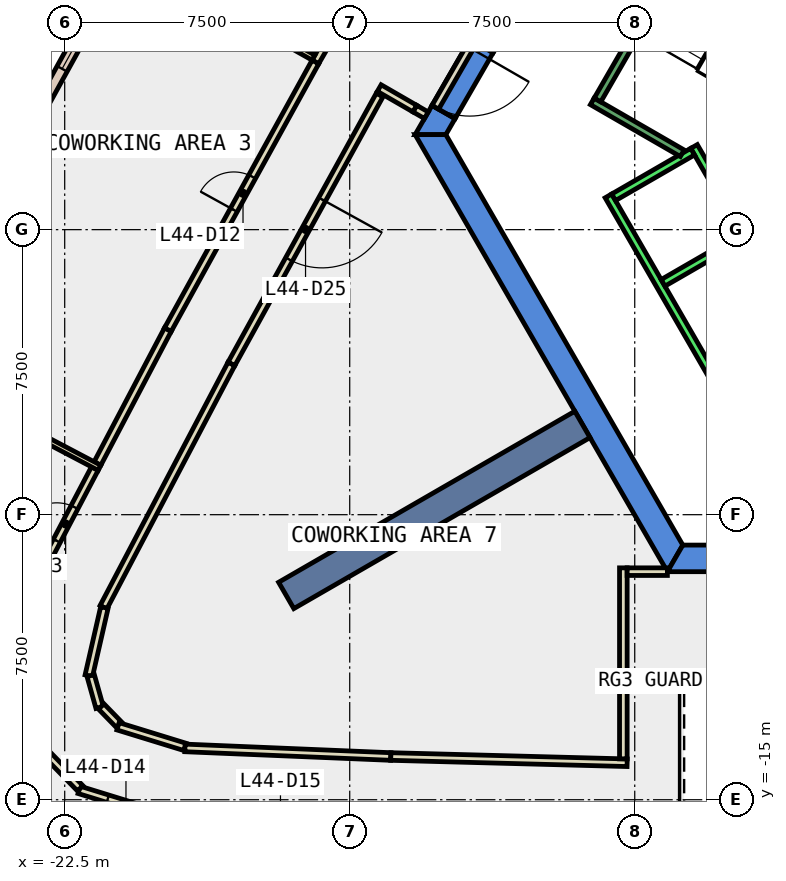
"""IFC4 building model, lengths in metres.
Left out: names, types, materials, properties, quantities, classifications, styles, units other than length and angle.
Written with IfcOpenShell. Run it as: python <this file> out.ifc"""

import sys

from ifc_helpers import new_model, si_unit, direction, frame, frame_2d, origin, place, context, subcontext, project, spatial, polyline, rectangle, outline, extrude, element, fill, save


model = new_model("IFC4")
c1 = context("Model", 3, precision=1e-05, world=origin(), true_north=direction((0.0, 1.0)))
c2 = subcontext(c1, "Body", "Model", "MODEL_VIEW")
j1 = project(units=[si_unit("LENGTHUNIT", "METRE"), si_unit("PLANEANGLEUNIT", "RADIAN")], contexts=[c1])
p1 = place(None, origin())
s1 = spatial("IfcSite", under=j1, at=p1, CompositionType="ELEMENT")
p2 = place(p1, origin())
s2 = spatial("IfcBuilding", under=s1, at=p2, CompositionType="ELEMENT")
p3 = place(p2, frame((0.0, 0.0, 198.2)))
s3 = spatial("IfcBuildingStorey", under=s2, at=p3, CompositionType="ELEMENT", Elevation=198.2)
p4 = place(p3, frame((0.0, 0.0, -0.4)))
e1 = element("IfcWall", 1, at=p4, inside=s3, PredefinedType="SHEAR", context=c2, shape_type="SweptSolid", body=[
    extrude(outline(polyline([(-11.834, 5.002), (-11.228, 4.652), (-6.235, 13.3), (-6.64, 14.0), (-11.834, 5.002)])), origin(), (0.0, 0.0, 1.0), 4.2),
])
p5 = place(p3, frame((0.0, 0.0, -0.4)))
e2 = element("IfcWall", 2, at=p5, inside=s3, PredefinedType="SHEAR", context=c2, shape_type="SweptSolid", body=[
    extrude(outline(polyline([(-12.228, 2.92), (-12.834, 3.27), (-13.279, 2.5), (-12.471, 2.5), (-12.228, 2.92)])), origin(), (0.0, 0.0, 1.0), 4.2),
])
p6 = place(p3, frame((0.0, 0.0, 3.6)))
e3 = element("IfcWall", 3, at=p6, inside=s3, PredefinedType="SHEAR", context=c2, shape_type="SweptSolid", body=[
    extrude(outline(polyline([(-12.834, 3.27), (-12.228, 2.92), (-11.228, 4.652), (-11.834, 5.002), (-12.834, 3.27)])), origin(), (0.0, 0.0, 1.0), 0.2),
])
p7 = place(p3, frame((0.0, 0.0, -0.4)))
e4 = element("IfcWall", 4, at=p7, inside=s3, PredefinedType="SHEAR", context=c2, shape_type="SweptSolid", body=[
    extrude(outline(polyline([(-13.279, 2.5), (-6.64, -9.0), (-6.235, -8.3), (-12.471, 2.5), (-13.279, 2.5)])), origin(), (0.0, 0.0, 1.0), 4.2),
])
p8 = place(p3, frame((0.0, 0.0, -0.4)))
e5 = element("IfcWall", 5, at=p8, inside=s3, PredefinedType="SHEAR", context=c2, shape_type="SweptSolid", body=[
    extrude(outline(polyline([(3.75, -9.0), (3.75, -8.3), (-6.235, -8.3), (-6.64, -9.0), (3.75, -9.0)])), origin(), (0.0, 0.0, 1.0), 4.2),
])
p9 = place(p3, frame((-8.877, -5.125, -0.4), z_axis=(0.0, 0.0, 1.0), x_axis=(-0.866017533419, -0.500013631625, 0.0)))
e6 = element("IfcWall", 6, at=p9, inside=s3, PredefinedType="SHEAR", context=c2, shape_type="SweptSolid", body=[
    extrude(rectangle(XDim=9.0, YDim=0.8, at=frame_2d((4.5, 0.0))), origin(), (0.0, 0.0, 1.0), 4.2),
])
p10 = place(p3, frame((-21.116, 6.865, 0.0), z_axis=(0.0, 0.0, 1.0), x_axis=(-0.482862185961, -0.875696356832, 0.0)))
e7 = element("IfcWall", 7, at=p10, inside=s3, PredefinedType="STANDARD", context=c2, shape_type="SweptSolid", body=[
    extrude(rectangle(XDim=7.23, YDim=0.3, at=frame_2d((3.615, 0.0))), origin(), (0.0, 0.0, 1.0), 3.8),
])
p11 = place(p10, frame((0.607, 0.0, 0.9)))
e8 = element("IfcOpeningElement", 8, at=p11, cuts=e7, PredefinedType="OPENING", context=c2, shape_type="SweptSolid", body=[
    extrude(rectangle(XDim=2.4, YDim=2.6, at=frame_2d((1.2, 1.3))), frame((0.0, 0.16, 0.0), z_axis=(0.0, -1.0, 0.0), x_axis=(1.0, 0.0, 0.0)), (0.0, 0.0, 1.0), 0.32),
])
p12 = place(p10, frame((4.222, 0.0, 0.9)))
e9 = element("IfcOpeningElement", 9, at=p12, cuts=e7, PredefinedType="OPENING", context=c2, shape_type="SweptSolid", body=[
    extrude(rectangle(XDim=2.4, YDim=2.6, at=frame_2d((1.2, 1.3))), frame((0.0, 0.16, 0.0), z_axis=(0.0, -1.0, 0.0), x_axis=(1.0, 0.0, 0.0)), (0.0, 0.0, 1.0), 0.32),
])
p13 = place(p3, frame((-18.112, -3.531, 0.0), z_axis=(0.0, 0.0, 1.0), x_axis=(-0.465461327558, -0.885068219149, 0.0)))
e10 = element("IfcWall", 10, at=p13, inside=s3, PredefinedType="PARTITIONING", context=c2, shape_type="SweptSolid", body=[
    extrude(rectangle(XDim=7.236, YDim=0.2, at=frame_2d((3.618, 0.0))), origin(), (0.0, 0.0, 1.0), 3.8),
])
p14 = place(p3, frame((-21.456, -9.944, 0.0), z_axis=(0.0, 0.0, 1.0), x_axis=(-0.222871656966, -0.974847795567, 0.0)))
e11 = element("IfcWall", 11, at=p14, inside=s3, PredefinedType="PARTITIONING", context=c2, shape_type="SweptSolid", body=[
    extrude(rectangle(XDim=1.839, YDim=0.2, at=frame_2d((0.919, 0.0))), origin(), (0.0, 0.0, 1.0), 3.8),
])
p15 = place(p3, frame((-21.816, -11.735, 0.0), z_axis=(0.0, 0.0, 1.0), x_axis=(0.270192443589, -0.962806337447, 0.0)))
e12 = element("IfcWall", 12, at=p15, inside=s3, PredefinedType="PARTITIONING", context=c2, shape_type="SweptSolid", body=[
    extrude(rectangle(XDim=0.869, YDim=0.2, at=frame_2d((0.435, 0.0))), origin(), (0.0, 0.0, 1.0), 3.8),
])
p16 = place(p3, frame((-21.538, -12.547, 0.0), z_axis=(0.0, 0.0, 1.0), x_axis=(0.697542638825, -0.716543276446, 0.0)))
e13 = element("IfcWall", 13, at=p16, inside=s3, PredefinedType="PARTITIONING", context=c2, shape_type="SweptSolid", body=[
    extrude(rectangle(XDim=0.668, YDim=0.2, at=frame_2d((0.334, 0.0))), origin(), (0.0, 0.0, 1.0), 3.8),
])
p17 = place(p3, frame((-21.097, -13.068, 0.0), z_axis=(0.0, 0.0, 1.0), x_axis=(0.955790442908, -0.294048685161, 0.0)))
e14 = element("IfcWall", 14, at=p17, inside=s3, PredefinedType="PARTITIONING", context=c2, shape_type="SweptSolid", body=[
    extrude(rectangle(XDim=1.846, YDim=0.2, at=frame_2d((0.923, 0.0))), origin(), (0.0, 0.0, 1.0), 3.8),
])
p18 = place(p3, frame((-19.336, -13.637, 0.0), z_axis=(0.0, 0.0, 1.0), x_axis=(0.999130261307, -0.041697972867, 0.0)))
e15 = element("IfcWall", 15, at=p18, inside=s3, PredefinedType="PARTITIONING", context=c2, shape_type="SweptSolid", body=[
    extrude(rectangle(XDim=5.422, YDim=0.2, at=frame_2d((2.711, 0.0))), origin(), (0.0, 0.0, 1.0), 3.8),
])
p19 = place(p3, frame((-13.919, -13.863, 0.0), z_axis=(0.0, 0.0, 1.0), x_axis=(0.999652206272, -0.026371698764, 0.0)))
e16 = element("IfcWall", 16, at=p19, inside=s3, PredefinedType="PARTITIONING", context=c2, shape_type="SweptSolid", body=[
    extrude(rectangle(XDim=6.221, YDim=0.2, at=frame_2d((3.111, 0.0))), origin(), (0.0, 0.0, 1.0), 3.8),
])
p20 = place(p3, frame((-12.984, 3.01, 0.0), z_axis=(0.0, 0.0, 1.0), x_axis=(-0.866046247233, 0.49996389635, 0.0)))
e17 = element("IfcWall", 17, at=p20, inside=s3, PredefinedType="PARTITIONING", context=c2, shape_type="SweptSolid", body=[
    extrude(rectangle(XDim=0.35, YDim=0.2, at=frame_2d((0.175, 0.0))), origin(), (0.0, 0.0, 1.0), 2.4),
])
p21 = place(p3, frame((-14.213, 3.543, 0.0), z_axis=(0.0, 0.0, 1.0), x_axis=(-0.482724934882, -0.875772023556, 0.0)))
e18 = element("IfcWall", 18, at=p21, inside=s3, PredefinedType="PARTITIONING", context=c2, shape_type="SweptSolid", body=[
    extrude(rectangle(XDim=8.077, YDim=0.2, at=frame_2d((4.039, 0.0))), origin(), (0.0, 0.0, 1.0), 3.8),
])
p22 = place(p21, frame((3.139, 0.0, 0.0)))
e19 = element("IfcOpeningElement", 19, at=p22, cuts=e18, PredefinedType="OPENING", context=c2, shape_type="SweptSolid", body=[
    extrude(rectangle(XDim=1.8, YDim=2.1, at=frame_2d((0.9, 1.05))), frame((0.0, 0.11, 0.0), z_axis=(0.0, -1.0, 0.0), x_axis=(1.0, 0.0, 0.0)), (0.0, 0.0, 1.0), 0.22),
])
p23 = place(p3, frame((-15.905, 4.412, 0.0), z_axis=(0.0, 0.0, 1.0), x_axis=(0.5000098125, 0.866019738461, 0.0)))
e20 = element("IfcWall", 20, at=p23, inside=s3, PredefinedType="PARTITIONING", context=c2, shape_type="SweptSolid", body=[
    extrude(rectangle(XDim=8.188, YDim=0.2, at=frame_2d((4.094, 0.0))), origin(), (0.0, 0.0, 1.0), 3.8),
])
p24 = place(p23, frame((3.594, 0.0, 0.0)))
e21 = element("IfcOpeningElement", 21, at=p24, cuts=e20, PredefinedType="OPENING", context=c2, shape_type="SweptSolid", body=[
    extrude(rectangle(XDim=1.0, YDim=2.1, at=frame_2d((0.5, 1.05))), frame((0.0, 0.11, 0.0), z_axis=(0.0, -1.0, 0.0), x_axis=(1.0, 0.0, 0.0)), (0.0, 0.0, 1.0), 0.22),
])
p25 = place(p3, frame((-21.638, -6.154, 0.0), z_axis=(0.0, 0.0, 1.0), x_axis=(0.465392595139, 0.885104362428, 0.0)))
e22 = element("IfcWall", 22, at=p25, inside=s3, PredefinedType="PARTITIONING", context=c2, shape_type="SweptSolid", body=[
    extrude(rectangle(XDim=3.982, YDim=0.2, at=frame_2d((1.991, 0.0))), origin(), (0.0, 0.0, 1.0), 3.8),
])
p26 = place(p3, frame((-19.785, -2.63, 0.0), z_axis=(0.0, 0.0, 1.0), x_axis=(0.482817232578, 0.875721142788, 0.0)))
e23 = element("IfcWall", 23, at=p26, inside=s3, PredefinedType="PARTITIONING", context=c2, shape_type="SweptSolid", body=[
    extrude(rectangle(XDim=8.04, YDim=0.2, at=frame_2d((4.02, 0.0))), origin(), (0.0, 0.0, 1.0), 3.8),
])
p27 = place(p26, frame((3.595, 0.0, 0.0)))
e24 = element("IfcOpeningElement", 24, at=p27, cuts=e23, PredefinedType="OPENING", context=c2, shape_type="SweptSolid", body=[
    extrude(rectangle(XDim=1.0, YDim=2.1, at=frame_2d((0.5, 1.05))), frame((0.0, 0.11, 0.0), z_axis=(0.0, -1.0, 0.0), x_axis=(1.0, 0.0, 0.0)), (0.0, 0.0, 1.0), 0.22),
])
p28 = place(p3, frame((-23.242, -9.204, 0.0), z_axis=(0.0, 0.0, 1.0), x_axis=(0.465431933571, 0.885083676955, 0.0)))
e25 = element("IfcWall", 25, at=p28, inside=s3, PredefinedType="PARTITIONING", context=c2, shape_type="SweptSolid", body=[
    extrude(rectangle(XDim=3.296, YDim=0.2, at=frame_2d((1.648, 0.0))), origin(), (0.0, 0.0, 1.0), 3.8),
])
p29 = place(p28, frame((1.148, 0.0, 0.0)))
e26 = element("IfcOpeningElement", 26, at=p29, cuts=e25, PredefinedType="OPENING", context=c2, shape_type="SweptSolid", body=[
    extrude(rectangle(XDim=1.0, YDim=2.1, at=frame_2d((0.5, 1.05))), frame((0.0, 0.11, 0.0), z_axis=(0.0, -1.0, 0.0), x_axis=(1.0, 0.0, 0.0)), (0.0, 0.0, 1.0), 0.22),
])
p30 = place(p3, frame((-19.657, -15.5, 0.0), z_axis=(0.0, 0.0, 1.0), x_axis=(-0.955612889251, 0.294625195625, 0.0)))
e27 = element("IfcWall", 27, at=p30, inside=s3, PredefinedType="PARTITIONING", context=c2, shape_type="SweptSolid", body=[
    extrude(rectangle(XDim=2.576, YDim=0.2, at=frame_2d((1.288, 0.0))), origin(), (0.0, 0.0, 1.0), 3.8),
])
p31 = place(p30, frame((0.788, 0.0, 0.0)))
e28 = element("IfcOpeningElement", 28, at=p31, cuts=e27, PredefinedType="OPENING", context=c2, shape_type="SweptSolid", body=[
    extrude(rectangle(XDim=1.0, YDim=2.1, at=frame_2d((0.5, 1.05))), frame((0.0, 0.11, 0.0), z_axis=(0.0, -1.0, 0.0), x_axis=(1.0, 0.0, 0.0)), (0.0, 0.0, 1.0), 0.22),
])
p32 = place(p3, frame((-22.093, -14.699, 0.0), z_axis=(0.0, 0.0, 1.0), x_axis=(-0.698551276451, 0.715560000397, 0.0)))
e29 = element("IfcWall", 29, at=p32, inside=s3, PredefinedType="PARTITIONING", context=c2, shape_type="SweptSolid", body=[
    extrude(rectangle(XDim=1.636, YDim=0.2, at=frame_2d((0.818, 0.0))), origin(), (0.0, 0.0, 1.0), 3.8),
])
p33 = place(p3, frame((-7.8, -13.924, 0.0), z_axis=(0.0, 0.0, 1.0), x_axis=(0.0, 1.0, 0.0)))
e30 = element("IfcWall", 30, at=p33, inside=s3, PredefinedType="PARTITIONING", context=c2, shape_type="SweptSolid", body=[
    extrude(rectangle(XDim=5.025, YDim=0.2, at=frame_2d((2.513, 0.0))), origin(), (0.0, 0.0, 1.0), 3.8),
])
p34 = place(p3, frame((-7.7, -8.999, 0.0), z_axis=(0.0, 0.0, 1.0), x_axis=(1.0, 0.0, 0.0)))
e31 = element("IfcWall", 31, at=p34, inside=s3, PredefinedType="PARTITIONING", context=c2, shape_type="SweptSolid", body=[
    extrude(rectangle(XDim=1.059, YDim=0.2, at=frame_2d((0.529, 0.0))), origin(), (0.0, 0.0, 1.0), 3.8),
])
p35 = place(p3, frame((-15.954, 4.526, 0.0), z_axis=(0.0, 0.0, 1.0), x_axis=(-0.870940016277, 0.491389344663, 0.0)))
e32 = element("IfcWall", 32, at=p35, inside=s3, PredefinedType="PARTITIONING", context=c2, shape_type="SweptSolid", body=[
    extrude(rectangle(XDim=4.18, YDim=0.15, at=frame_2d((2.09, 0.0))), origin(), (0.0, 0.0, 1.0), 3.8),
])
p36 = place(p3, frame((-21.585, -6.267, 0.0), z_axis=(0.0, 0.0, 1.0), x_axis=(-0.885073333504, 0.465451602554, 0.0)))
e33 = element("IfcWall", 33, at=p36, inside=s3, PredefinedType="PARTITIONING", context=c2, shape_type="SweptSolid", body=[
    extrude(rectangle(XDim=5.7, YDim=0.15, at=frame_2d((2.85, 0.0))), origin(), (0.0, 0.0, 1.0), 3.8),
])
p37 = place(p3, frame((-11.747, 4.952, 0.0), z_axis=(0.0, 0.0, 1.0), x_axis=(-0.50002537861, -0.866010750942, 0.0)))
e34 = element("IfcWall", 34, at=p37, inside=s3, PredefinedType="PARTITIONING", context=c2, shape_type="SweptSolid", body=[
    extrude(rectangle(XDim=2.0, YDim=0.2, at=frame_2d((1.0, 0.0))), origin(), (0.0, 0.0, 1.0), 2.4),
])
p38 = place(p37, frame((0.19, 0.0, 0.0)))
e35 = element("IfcOpeningElement", 35, at=p38, cuts=e34, PredefinedType="OPENING", context=c2, shape_type="SweptSolid", body=[
    extrude(rectangle(XDim=1.8, YDim=2.1, at=frame_2d((0.9, 1.05))), frame((0.0, 0.11, 0.0), z_axis=(0.0, -1.0, 0.0), x_axis=(1.0, 0.0, 0.0)), (0.0, 0.0, 1.0), 0.22),
])
p39 = place(p3, frame((-13.287, 3.185, 0.0), z_axis=(0.0, 0.0, 1.0), x_axis=(-0.866121626761, 0.499833299868, 0.0)))
e36 = element("IfcWall", 36, at=p39, inside=s3, PredefinedType="PARTITIONING", context=c2, shape_type="SweptSolid", body=[
    extrude(rectangle(XDim=1.08, YDim=0.2, at=frame_2d((0.54, 0.0))), origin(), (0.0, 0.0, 1.0), 3.8),
])
p40 = place(p3, frame((-5.94, 2.188, 0.0), z_axis=(0.0, 0.0, 1.0), x_axis=(0.500034260056, -0.866005622828, 0.0)))
e37 = element("IfcWall", 37, at=p40, inside=s3, PredefinedType="STANDARD", context=c2, shape_type="SweptSolid", body=[
    extrude(rectangle(XDim=5.399, YDim=0.2, at=frame_2d((2.7, 0.0))), origin(), (0.0, 0.0, 1.0), 3.8),
])
p41 = place(p40, frame((3.075, 0.0, 0.0)))
e38 = element("IfcOpeningElement", 38, at=p41, cuts=e37, PredefinedType="OPENING", context=c2, shape_type="SweptSolid", body=[
    extrude(rectangle(XDim=1.1, YDim=2.1, at=frame_2d((0.55, 1.05))), frame((0.0, 0.11, 0.0), z_axis=(0.0, -1.0, 0.0), x_axis=(1.0, 0.0, 0.0)), (0.0, 0.0, 1.0), 0.22),
])
p42 = place(p40, frame((1.225, 0.0, 0.0)))
e39 = element("IfcOpeningElement", 39, at=p42, cuts=e37, PredefinedType="OPENING", context=c2, shape_type="SweptSolid", body=[
    extrude(rectangle(XDim=1.1, YDim=2.1, at=frame_2d((0.55, 1.05))), frame((0.0, 0.11, 0.0), z_axis=(0.0, -1.0, 0.0), x_axis=(1.0, 0.0, 0.0)), (0.0, 0.0, 1.0), 0.22),
])
p43 = place(p3, frame((-8.192, 0.888, 0.0), z_axis=(0.0, 0.0, 1.0), x_axis=(0.500034260056, -0.866005622828, 0.0)))
e40 = element("IfcWall", 40, at=p43, inside=s3, PredefinedType="STANDARD", context=c2, shape_type="SweptSolid", body=[
    extrude(rectangle(XDim=5.399, YDim=0.2, at=frame_2d((2.7, 0.0))), origin(), (0.0, 0.0, 1.0), 3.8),
])
for number, where, z_axis, x_axis in (
    (41, (-5.977, 2.052, 0.0), (0.0, 0.0, 1.0), (-0.866, -0.5, 0.0)),
    (42, (-4.677, -0.2, 0.0), (0.0, 0.0, 1.0), (-0.866, -0.5, 0.0)),
):
    element("IfcWall", number, at=place(p3, frame(where, z_axis=z_axis, x_axis=x_axis)), inside=s3, PredefinedType="STANDARD", context=c2, shape_type="SweptSolid", body=[
        extrude(rectangle(XDim=2.399, YDim=0.2, at=frame_2d((1.2, 0.0))), origin(), (0.0, 0.0, 1.0), 3.8),
    ])
p44 = place(p3, frame((-6.25, 2.01, 0.0), z_axis=(0.0, 0.0, 1.0), x_axis=(-0.86611865017, 0.499838457731, 0.0)))
e43 = element("IfcWall", 43, at=p44, inside=s3, PredefinedType="STANDARD", context=c2, shape_type="SweptSolid", body=[
    extrude(rectangle(XDim=2.733, YDim=0.2, at=frame_2d((1.366, 0.0))), origin(), (0.0, 0.0, 1.0), 3.8),
])
p45 = place(p3, frame((-5.03, 9.388, 0.0), z_axis=(0.0, 0.0, 1.0), x_axis=(-0.499978703459, -0.866037698999, 0.0)))
e44 = element("IfcWall", 44, at=p45, inside=s3, PredefinedType="STANDARD", context=c2, shape_type="SweptSolid", body=[
    extrude(rectangle(XDim=6.9, YDim=0.2, at=frame_2d((3.45, 0.0))), origin(), (0.0, 0.0, 1.0), 3.8),
])
p46 = place(p11, origin())
e45 = element("IfcWindow", 45, at=p46, inside=s3, PartitioningType="SINGLE_PANEL", PredefinedType="WINDOW", context=c2, shape_type="SweptSolid", body=[
    extrude(rectangle(XDim=2.4, YDim=2.6, at=frame_2d((1.2, 1.3))), frame((0.0, 0.03, 0.0), z_axis=(0.0, -1.0, 0.0), x_axis=(1.0, 0.0, 0.0)), (0.0, 0.0, 1.0), 0.06),
])
fill(e8, e45)
p47 = place(p27, origin())
e46 = element("IfcDoor", 46, at=p47, inside=s3, OperationType="SINGLE_SWING_LEFT", PredefinedType="DOOR", context=c2, shape_type="SweptSolid", body=[
    extrude(rectangle(XDim=1.0, YDim=2.1, at=frame_2d((0.5, 1.05))), frame((0.0, 0.025, 0.0), z_axis=(0.0, -1.0, 0.0), x_axis=(1.0, 0.0, 0.0)), (0.0, 0.0, 1.0), 0.05),
])
fill(e24, e46)
p48 = place(p29, origin())
e47 = element("IfcDoor", 47, at=p48, inside=s3, OperationType="SINGLE_SWING_RIGHT", PredefinedType="DOOR", context=c2, shape_type="SweptSolid", body=[
    extrude(rectangle(XDim=1.0, YDim=2.1, at=frame_2d((0.5, 1.05))), frame((0.0, 0.025, 0.0), z_axis=(0.0, -1.0, 0.0), x_axis=(1.0, 0.0, 0.0)), (0.0, 0.0, 1.0), 0.05),
])
fill(e26, e47)
p49 = place(p31, origin())
e48 = element("IfcDoor", 48, at=p49, inside=s3, OperationType="SINGLE_SWING_LEFT", PredefinedType="DOOR", context=c2, shape_type="SweptSolid", body=[
    extrude(rectangle(XDim=1.0, YDim=2.1, at=frame_2d((0.5, 1.05))), frame((0.0, 0.025, 0.0), z_axis=(0.0, -1.0, 0.0), x_axis=(1.0, 0.0, 0.0)), (0.0, 0.0, 1.0), 0.05),
])
fill(e28, e48)
p50 = place(p22, origin())
e49 = element("IfcDoor", 49, at=p50, inside=s3, OperationType="DOUBLE_DOOR_SINGLE_SWING", PredefinedType="DOOR", context=c2, shape_type="SweptSolid", body=[
    extrude(rectangle(XDim=1.8, YDim=2.1, at=frame_2d((0.9, 1.05))), frame((0.0, 0.025, 0.0), z_axis=(0.0, -1.0, 0.0), x_axis=(1.0, 0.0, 0.0)), (0.0, 0.0, 1.0), 0.05),
])
fill(e19, e49)
p51 = place(p38, origin())
e50 = element("IfcDoor", 50, at=p51, inside=s3, OperationType="DOUBLE_DOOR_SINGLE_SWING", PredefinedType="DOOR", context=c2, shape_type="SweptSolid", body=[
    extrude(rectangle(XDim=1.8, YDim=2.1, at=frame_2d((0.9, 1.05))), frame((0.0, 0.025, 0.0), z_axis=(0.0, -1.0, 0.0), x_axis=(1.0, 0.0, 0.0)), (0.0, 0.0, 1.0), 0.05),
])
fill(e35, e50)
save(model, sys.argv[1])
